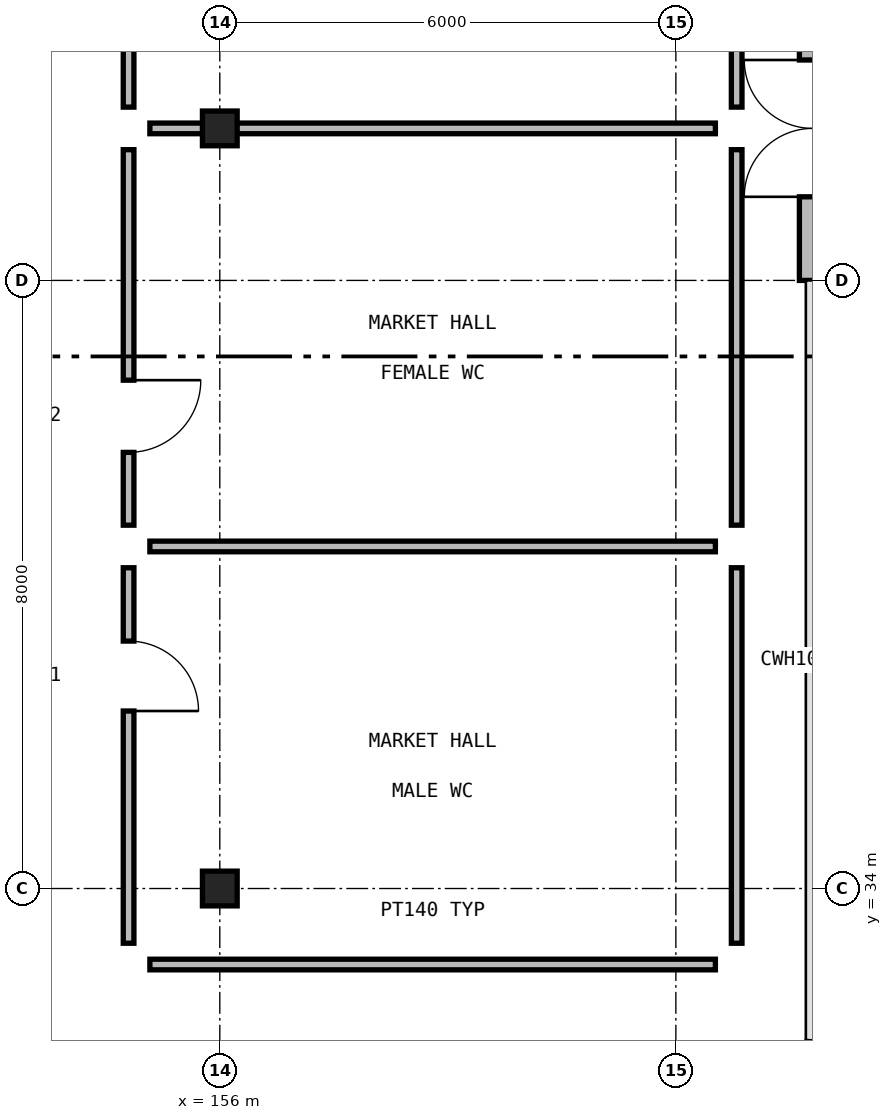
"""IFC4 building model, lengths in metres.
Left out: names, types, materials, properties, quantities, classifications, styles, units other than length and angle.
Written with IfcOpenShell. Run it as: python <this file> out.ifc"""

import sys

from ifc_helpers import new_model, si_unit, direction, frame, frame_2d, origin, origin_2d_with_axis, place, context, subcontext, project, spatial, rectangle, hollow_circle, extrude, element, fill, save


model = new_model("IFC4")
c1 = context("Model", 3, precision=1e-05, world=origin(), true_north=direction((0.0, 1.0)))
c2 = subcontext(c1, "Body", "Model", "MODEL_VIEW")
j1 = project(units=[si_unit("LENGTHUNIT", "METRE"), si_unit("PLANEANGLEUNIT", "RADIAN")], contexts=[c1])
p1 = place(None, origin())
s1 = spatial("IfcSite", under=j1, at=p1, CompositionType="ELEMENT")
p2 = place(p1, origin())
s2 = spatial("IfcBuilding", under=s1, at=p2, CompositionType="ELEMENT")
p3 = place(p2, origin())
s3 = spatial("IfcBuildingStorey", under=s2, at=p3, CompositionType="ELEMENT", Elevation=0.0)
for number, where, z_axis, x_axis in (
    (1, (156.0, 34.0, 0.0), (0.0, 0.0, 1.0), (1.0, 0.0, 0.0)),
    (2, (156.0, 44.0, 0.0), (0.0, 0.0, 1.0), (1.0, 0.0, 0.0)),
):
    element("IfcColumn", number, at=place(p3, frame(where, z_axis=z_axis, x_axis=x_axis)), inside=s3, PredefinedType="COLUMN", context=c2, shape_type="SweptSolid", body=[
        extrude(hollow_circle(Radius=0.229, WallThickness=0.013, at=origin_2d_with_axis()), origin(), (0.0, 0.0, 1.0), 4.5),
    ])
p4 = place(p3, frame((163.8, 42.0, 0.0), z_axis=(0.0, 0.0, 1.0), x_axis=(0.0, 1.0, 0.0)))
e3 = element("IfcWall", 3, at=p4, inside=s3, PredefinedType="SOLIDWALL", context=c2, shape_type="SweptSolid", body=[
    extrude(rectangle(XDim=4.0, YDim=0.35, at=frame_2d((2.0, 0.0), x_axis=(1.0, 0.0))), origin(), (0.0, 0.0, 1.0), 4.24),
])
p5 = place(p4, frame((1.1, 0.0, 0.0)))
e4 = element("IfcOpeningElement", 4, at=p5, cuts=e3, PredefinedType="OPENING", context=c2, shape_type="SweptSolid", body=[
    extrude(rectangle(XDim=1.8, YDim=2.4, at=frame_2d((0.9, 1.2), x_axis=(1.0, 0.0))), frame((0.0, 0.185, 0.0), z_axis=(0.0, -1.0, 0.0), x_axis=(1.0, 0.0, 0.0)), (0.0, 0.0, 1.0), 0.37),
])
p6 = place(p3, frame((155.08, 33.0, 0.0), z_axis=(0.0, 0.0, 1.0), x_axis=(1.0, 0.0, 0.0)))
e5 = element("IfcWall", 5, at=p6, inside=s3, PredefinedType="PLUMBINGWALL", context=c2, shape_type="SweptSolid", body=[
    extrude(rectangle(XDim=7.44, YDim=0.14, at=frame_2d((3.72, 0.0), x_axis=(1.0, 0.0))), origin(), (0.0, 0.0, 1.0), 3.62),
])
p7 = place(p3, frame((162.8, 33.28, 0.0), z_axis=(0.0, 0.0, 1.0), x_axis=(0.0, 1.0, 0.0)))
e6 = element("IfcWall", 6, at=p7, inside=s3, PredefinedType="PLUMBINGWALL", context=c2, shape_type="SweptSolid", body=[
    extrude(rectangle(XDim=4.94, YDim=0.14, at=frame_2d((2.47, 0.0), x_axis=(1.0, 0.0))), origin(), (0.0, 0.0, 1.0), 3.62),
])
p8 = place(p3, frame((162.52, 38.5, 0.0), z_axis=(0.0, 0.0, 1.0), x_axis=(-1.0, 0.0, 0.0)))
e7 = element("IfcWall", 7, at=p8, inside=s3, PredefinedType="PLUMBINGWALL", context=c2, shape_type="SweptSolid", body=[
    extrude(rectangle(XDim=7.44, YDim=0.14, at=frame_2d((3.72, 0.0), x_axis=(1.0, 0.0))), origin(), (0.0, 0.0, 1.0), 3.62),
])
p9 = place(p3, frame((154.8, 38.22, 0.0), z_axis=(0.0, 0.0, 1.0), x_axis=(0.0, -1.0, 0.0)))
e8 = element("IfcWall", 8, at=p9, inside=s3, PredefinedType="PLUMBINGWALL", context=c2, shape_type="SweptSolid", body=[
    extrude(rectangle(XDim=4.94, YDim=0.14, at=frame_2d((2.47, 0.0), x_axis=(1.0, 0.0))), origin(), (0.0, 0.0, 1.0), 3.62),
])
p10 = place(p9, frame((0.965, 0.0, 0.0)))
e9 = element("IfcOpeningElement", 9, at=p10, cuts=e8, PredefinedType="OPENING", context=c2, shape_type="SweptSolid", body=[
    extrude(rectangle(XDim=0.92, YDim=2.15, at=frame_2d((0.46, 1.075), x_axis=(1.0, 0.0))), frame((0.0, 0.08, 0.0), z_axis=(0.0, -1.0, 0.0), x_axis=(1.0, 0.0, 0.0)), (0.0, 0.0, 1.0), 0.16),
])
p11 = place(p3, frame((162.8, 38.78, 0.0), z_axis=(0.0, 0.0, 1.0), x_axis=(0.0, 1.0, 0.0)))
e10 = element("IfcWall", 10, at=p11, inside=s3, PredefinedType="PLUMBINGWALL", context=c2, shape_type="SweptSolid", body=[
    extrude(rectangle(XDim=4.94, YDim=0.14, at=frame_2d((2.47, 0.0), x_axis=(1.0, 0.0))), origin(), (0.0, 0.0, 1.0), 3.62),
])
p12 = place(p3, frame((162.52, 44.0, 0.0), z_axis=(0.0, 0.0, 1.0), x_axis=(-1.0, 0.0, 0.0)))
e11 = element("IfcWall", 11, at=p12, inside=s3, PredefinedType="PLUMBINGWALL", context=c2, shape_type="SweptSolid", body=[
    extrude(rectangle(XDim=7.44, YDim=0.14, at=frame_2d((3.72, 0.0), x_axis=(1.0, 0.0))), origin(), (0.0, 0.0, 1.0), 3.62),
])
p13 = place(p3, frame((154.8, 43.72, 0.0), z_axis=(0.0, 0.0, 1.0), x_axis=(0.0, -1.0, 0.0)))
e12 = element("IfcWall", 12, at=p13, inside=s3, PredefinedType="PLUMBINGWALL", context=c2, shape_type="SweptSolid", body=[
    extrude(rectangle(XDim=4.94, YDim=0.14, at=frame_2d((2.47, 0.0), x_axis=(1.0, 0.0))), origin(), (0.0, 0.0, 1.0), 3.62),
])
p14 = place(p13, frame((3.032, 0.0, 0.0)))
e13 = element("IfcOpeningElement", 13, at=p14, cuts=e12, PredefinedType="OPENING", context=c2, shape_type="SweptSolid", body=[
    extrude(rectangle(XDim=0.95, YDim=2.15, at=frame_2d((0.475, 1.075), x_axis=(1.0, 0.0))), frame((0.0, 0.08, 0.0), z_axis=(0.0, -1.0, 0.0), x_axis=(1.0, 0.0, 0.0)), (0.0, 0.0, 1.0), 0.16),
])
p15 = place(p3, frame((162.8, 44.28, 0.0), z_axis=(0.0, 0.0, 1.0), x_axis=(0.0, 1.0, 0.0)))
e14 = element("IfcWall", 14, at=p15, inside=s3, PredefinedType="PLUMBINGWALL", context=c2, shape_type="SweptSolid", body=[
    extrude(rectangle(XDim=4.94, YDim=0.14, at=frame_2d((2.47, 0.0), x_axis=(1.0, 0.0))), origin(), (0.0, 0.0, 1.0), 3.62),
])
p16 = place(p3, frame((154.8, 49.22, 0.0), z_axis=(0.0, 0.0, 1.0), x_axis=(0.0, -1.0, 0.0)))
e15 = element("IfcWall", 15, at=p16, inside=s3, PredefinedType="PLUMBINGWALL", context=c2, shape_type="SweptSolid", body=[
    extrude(rectangle(XDim=4.94, YDim=0.14, at=frame_2d((2.47, 0.0), x_axis=(1.0, 0.0))), origin(), (0.0, 0.0, 1.0), 3.62),
])
p17 = place(p16, frame((0.965, 0.0, 0.0)))
e16 = element("IfcOpeningElement", 16, at=p17, cuts=e15, PredefinedType="OPENING", context=c2, shape_type="SweptSolid", body=[
    extrude(rectangle(XDim=0.92, YDim=2.15, at=frame_2d((0.46, 1.075), x_axis=(1.0, 0.0))), frame((0.0, 0.08, 0.0), z_axis=(0.0, -1.0, 0.0), x_axis=(1.0, 0.0, 0.0)), (0.0, 0.0, 1.0), 0.16),
])
p18 = place(p5, origin())
e17 = element("IfcDoor", 17, at=p18, inside=s3, OperationType="DOUBLE_SWING_RIGHT", PredefinedType="DOOR", context=c2, shape_type="SweptSolid", body=[
    extrude(rectangle(XDim=1.8, YDim=2.4, at=frame_2d((0.9, 1.2), x_axis=(1.0, 0.0))), frame((0.0, 0.025, 0.0), z_axis=(0.0, -1.0, 0.0), x_axis=(1.0, 0.0, 0.0)), (0.0, 0.0, 1.0), 0.05),
])
fill(e4, e17)
p19 = place(p10, origin())
e18 = element("IfcDoor", 18, at=p19, inside=s3, OperationType="SINGLE_SWING_RIGHT", PredefinedType="DOOR", context=c2, shape_type="SweptSolid", body=[
    extrude(rectangle(XDim=0.92, YDim=2.15, at=frame_2d((0.46, 1.075), x_axis=(1.0, 0.0))), frame((0.0, 0.025, 0.0), z_axis=(0.0, -1.0, 0.0), x_axis=(1.0, 0.0, 0.0)), (0.0, 0.0, 1.0), 0.05),
])
fill(e9, e18)
p20 = place(p14, origin())
e19 = element("IfcDoor", 19, at=p20, inside=s3, OperationType="SINGLE_SWING_LEFT", PredefinedType="DOOR", context=c2, shape_type="SweptSolid", body=[
    extrude(rectangle(XDim=0.95, YDim=2.15, at=frame_2d((0.475, 1.075), x_axis=(1.0, 0.0))), frame((0.0, 0.025, 0.0), z_axis=(0.0, -1.0, 0.0), x_axis=(1.0, 0.0, 0.0)), (0.0, 0.0, 1.0), 0.05),
])
fill(e13, e19)
save(model, sys.argv[1])
